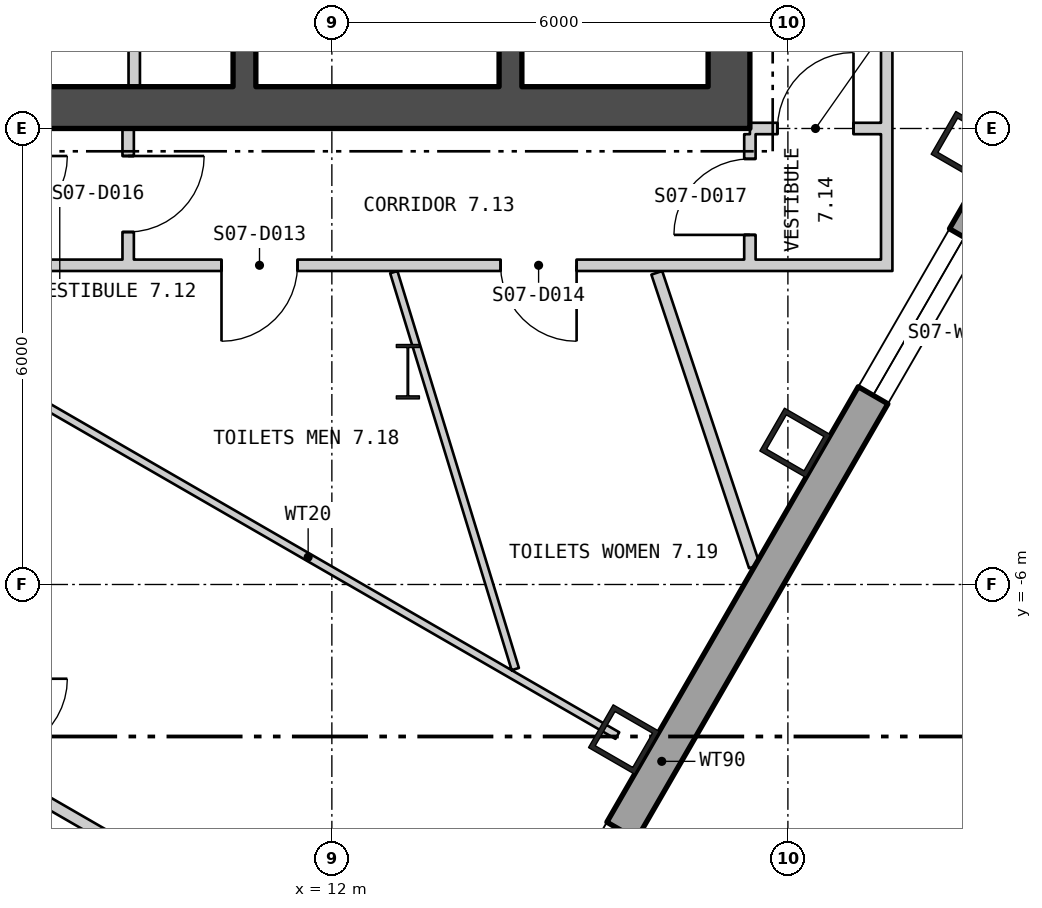
"""IFC4 building model, lengths in metres.
Left out: names, types, materials, properties, quantities, classifications, styles, units other than length and angle.
Written with IfcOpenShell. Run it as: python <this file> out.ifc"""

import sys

from ifc_helpers import new_model, si_unit, direction, frame, frame_2d, origin, origin_2d, place, context, subcontext, project, spatial, polyline, rectangle, hollow_rectangle, i_section, outline, extrude, element, fill, save


model = new_model("IFC4")
c1 = context("Model", 3, precision=1e-05, world=origin(), true_north=direction((0.0, 1.0)))
c2 = subcontext(c1, "Body", "Model", "MODEL_VIEW")
j1 = project(units=[si_unit("LENGTHUNIT", "METRE"), si_unit("PLANEANGLEUNIT", "RADIAN")], contexts=[c1])
p1 = place(None, origin())
s1 = spatial("IfcSite", under=j1, at=p1, CompositionType="ELEMENT")
p2 = place(p1, origin())
s2 = spatial("IfcBuilding", under=s1, at=p2, CompositionType="ELEMENT")
p3 = place(p2, frame((0.0, 0.0, 97.8)))
s3 = spatial("IfcBuildingStorey", under=s2, at=p3, CompositionType="ELEMENT", Elevation=97.8)
for number, where, z_axis, x_axis in (
    (1, (15.842, -8.039, 0.0), (0.0, 0.0, 1.0), (0.5, 0.866, 0.0)),
    (2, (18.096, -4.136, 0.0), (0.0, 0.0, 1.0), (0.5, 0.866, 0.0)),
    (3, (20.35, -0.232, 0.0), (0.0, 0.0, 1.0), (0.5, 0.866, 0.0)),
):
    element("IfcColumn", number, at=place(p3, frame(where, z_axis=z_axis, x_axis=x_axis)), inside=s3, PredefinedType="COLUMN", context=c2, shape_type="SweptSolid", body=[
        extrude(hollow_rectangle(XDim=0.65, YDim=0.7, WallThickness=0.065, at=origin_2d()), origin(), (0.0, 0.0, 1.0), 4.5),
    ])
p4 = place(p3, frame((13.0, -3.2, 0.0), z_axis=(0.0, 0.0, 1.0), x_axis=(1.0, 0.0, 0.0)))
e4 = element("IfcColumn", 4, at=p4, inside=s3, PredefinedType="COLUMN", context=c2, shape_type="SweptSolid", body=[
    extrude(i_section(OverallWidth=0.304, OverallDepth=0.716, WebThickness=0.021, FlangeThickness=0.04, at=origin_2d()), origin(), (0.0, 0.0, 1.0), 4.5),
])
p5 = place(p3, frame((4.905, -28.133, -0.18), z_axis=(0.0, 0.0, 1.0), x_axis=(0.500000711659, 0.866024992908, 0.0)))
e5 = element("IfcWall", 5, at=p5, inside=s3, PredefinedType="SOLIDWALL", context=c2, shape_type="SweptSolid", body=[
    extrude(outline(polyline([(-0.13, -0.225), (45.87, -0.225), (45.61, 0.225), (0.13, 0.225), (-0.13, -0.225)])), origin(), (0.0, 0.0, 1.0), 4.28),
])
p6 = place(p5, frame((1.424, 0.0, 1.08)))
e6 = element("IfcOpeningElement", 6, at=p6, cuts=e5, PredefinedType="OPENING", context=c2, shape_type="SweptSolid", body=[
    extrude(rectangle(XDim=2.4, YDim=2.6, at=frame_2d((1.2, 1.3))), frame((0.0, 0.235, 0.0), z_axis=(0.0, -1.0, 0.0), x_axis=(1.0, 0.0, 0.0)), (0.0, 0.0, 1.0), 0.47),
])
p7 = place(p5, frame((5.893, 0.0, 1.08)))
e7 = element("IfcOpeningElement", 7, at=p7, cuts=e5, PredefinedType="OPENING", context=c2, shape_type="SweptSolid", body=[
    extrude(rectangle(XDim=2.4, YDim=2.6, at=frame_2d((1.2, 1.3))), frame((0.0, 0.235, 0.0), z_axis=(0.0, -1.0, 0.0), x_axis=(1.0, 0.0, 0.0)), (0.0, 0.0, 1.0), 0.47),
])
p8 = place(p5, frame((10.401, 0.0, 1.08)))
e8 = element("IfcOpeningElement", 8, at=p8, cuts=e5, PredefinedType="OPENING", context=c2, shape_type="SweptSolid", body=[
    extrude(rectangle(XDim=2.4, YDim=2.6, at=frame_2d((1.2, 1.3))), frame((0.0, 0.235, 0.0), z_axis=(0.0, -1.0, 0.0), x_axis=(1.0, 0.0, 0.0)), (0.0, 0.0, 1.0), 0.47),
])
p9 = place(p5, frame((14.909, 0.0, 1.08)))
e9 = element("IfcOpeningElement", 9, at=p9, cuts=e5, PredefinedType="OPENING", context=c2, shape_type="SweptSolid", body=[
    extrude(rectangle(XDim=2.4, YDim=2.6, at=frame_2d((1.2, 1.3))), frame((0.0, 0.235, 0.0), z_axis=(0.0, -1.0, 0.0), x_axis=(1.0, 0.0, 0.0)), (0.0, 0.0, 1.0), 0.47),
])
p10 = place(p5, frame((19.416, 0.0, 1.08)))
e10 = element("IfcOpeningElement", 10, at=p10, cuts=e5, PredefinedType="OPENING", context=c2, shape_type="SweptSolid", body=[
    extrude(rectangle(XDim=2.4, YDim=2.6, at=frame_2d((1.2, 1.3))), frame((0.0, 0.235, 0.0), z_axis=(0.0, -1.0, 0.0), x_axis=(1.0, 0.0, 0.0)), (0.0, 0.0, 1.0), 0.47),
])
p11 = place(p5, frame((28.431, 0.0, 1.08)))
e11 = element("IfcOpeningElement", 11, at=p11, cuts=e5, PredefinedType="OPENING", context=c2, shape_type="SweptSolid", body=[
    extrude(rectangle(XDim=2.4, YDim=2.6, at=frame_2d((1.2, 1.3))), frame((0.0, 0.235, 0.0), z_axis=(0.0, -1.0, 0.0), x_axis=(1.0, 0.0, 0.0)), (0.0, 0.0, 1.0), 0.47),
])
p12 = place(p5, frame((32.939, 0.0, 1.08)))
e12 = element("IfcOpeningElement", 12, at=p12, cuts=e5, PredefinedType="OPENING", context=c2, shape_type="SweptSolid", body=[
    extrude(rectangle(XDim=2.4, YDim=2.6, at=frame_2d((1.2, 1.3))), frame((0.0, 0.235, 0.0), z_axis=(0.0, -1.0, 0.0), x_axis=(1.0, 0.0, 0.0)), (0.0, 0.0, 1.0), 0.47),
])
p13 = place(p5, frame((37.447, 0.0, 1.08)))
e13 = element("IfcOpeningElement", 13, at=p13, cuts=e5, PredefinedType="OPENING", context=c2, shape_type="SweptSolid", body=[
    extrude(rectangle(XDim=2.4, YDim=2.6, at=frame_2d((1.2, 1.3))), frame((0.0, 0.235, 0.0), z_axis=(0.0, -1.0, 0.0), x_axis=(1.0, 0.0, 0.0)), (0.0, 0.0, 1.0), 0.47),
])
p14 = place(p5, frame((41.916, 0.0, 1.08)))
e14 = element("IfcOpeningElement", 14, at=p14, cuts=e5, PredefinedType="OPENING", context=c2, shape_type="SweptSolid", body=[
    extrude(rectangle(XDim=2.4, YDim=2.6, at=frame_2d((1.2, 1.3))), frame((0.0, 0.235, 0.0), z_axis=(0.0, -1.0, 0.0), x_axis=(1.0, 0.0, 0.0)), (0.0, 0.0, 1.0), 0.47),
])
p15 = place(p3, frame((-17.5, 0.275, 0.0), z_axis=(0.0, 0.0, 1.0), x_axis=(1.0, 0.0, 0.0)))
e15 = element("IfcWall", 15, at=p15, inside=s3, PredefinedType="SHEAR", context=c2, shape_type="SweptSolid", body=[
    extrude(rectangle(XDim=35.0, YDim=0.55, at=frame_2d((17.5, 0.0))), origin(), (0.0, 0.0, 1.0), 4.3),
])
p16 = place(p15, frame((12.0, 0.0, 0.0)))
e16 = element("IfcOpeningElement", 16, at=p16, cuts=e15, PredefinedType="OPENING", context=c2, shape_type="SweptSolid", body=[
    extrude(rectangle(XDim=1.8, YDim=2.4, at=frame_2d((0.9, 1.2))), frame((0.0, 0.285, 0.0), z_axis=(0.0, -1.0, 0.0), x_axis=(1.0, 0.0, 0.0)), (0.0, 0.0, 1.0), 0.57),
])
p17 = place(p15, frame((22.0, 0.0, 0.0)))
e17 = element("IfcOpeningElement", 17, at=p17, cuts=e15, PredefinedType="OPENING", context=c2, shape_type="SweptSolid", body=[
    extrude(rectangle(XDim=1.8, YDim=2.4, at=frame_2d((0.9, 1.2))), frame((0.0, 0.285, 0.0), z_axis=(0.0, -1.0, 0.0), x_axis=(1.0, 0.0, 0.0)), (0.0, 0.0, 1.0), 0.57),
])
p18 = place(p3, frame((17.225, 0.55, 0.0), z_axis=(0.0, 0.0, 1.0), x_axis=(0.0, 1.0, 0.0)))
e18 = element("IfcWall", 18, at=p18, inside=s3, PredefinedType="SHEAR", context=c2, shape_type="SweptSolid", body=[
    extrude(rectangle(XDim=16.9, YDim=0.55, at=frame_2d((8.45, 0.0))), origin(), (0.0, 0.0, 1.0), 4.3),
])
p19 = place(p18, frame((5.75, 0.0, 0.0)))
e19 = element("IfcOpeningElement", 19, at=p19, cuts=e18, PredefinedType="OPENING", context=c2, shape_type="SweptSolid", body=[
    extrude(rectangle(XDim=1.5, YDim=2.1, at=frame_2d((0.75, 1.05))), frame((0.0, 0.285, 0.0), z_axis=(0.0, -1.0, 0.0), x_axis=(1.0, 0.0, 0.0)), (0.0, 0.0, 1.0), 0.57),
])
p20 = place(p18, frame((0.628, 0.0, 0.0)))
e20 = element("IfcOpeningElement", 20, at=p20, cuts=e18, PredefinedType="OPENING", context=c2, shape_type="SweptSolid", body=[
    extrude(rectangle(XDim=1.0, YDim=2.1, at=frame_2d((0.5, 1.05))), frame((0.0, 0.285, 0.0), z_axis=(0.0, -1.0, 0.0), x_axis=(1.0, 0.0, 0.0)), (0.0, 0.0, 1.0), 0.57),
])
p21 = place(p18, frame((3.553, 0.0, 0.0)))
e21 = element("IfcOpeningElement", 21, at=p21, cuts=e18, PredefinedType="OPENING", context=c2, shape_type="SweptSolid", body=[
    extrude(rectangle(XDim=0.9, YDim=2.1, at=frame_2d((0.45, 1.05))), frame((0.0, 0.285, 0.0), z_axis=(0.0, -1.0, 0.0), x_axis=(1.0, 0.0, 0.0)), (0.0, 0.0, 1.0), 0.57),
])
p22 = place(p18, frame((8.914, 0.0, 0.0)))
e22 = element("IfcOpeningElement", 22, at=p22, cuts=e18, PredefinedType="OPENING", context=c2, shape_type="SweptSolid", body=[
    extrude(rectangle(XDim=0.9, YDim=2.1, at=frame_2d((0.45, 1.05))), frame((0.0, 0.285, 0.0), z_axis=(0.0, -1.0, 0.0), x_axis=(1.0, 0.0, 0.0)), (0.0, 0.0, 1.0), 0.57),
])
p23 = place(p18, frame((13.739, 0.0, 0.0)))
e23 = element("IfcOpeningElement", 23, at=p23, cuts=e18, PredefinedType="OPENING", context=c2, shape_type="SweptSolid", body=[
    extrude(rectangle(XDim=0.9, YDim=2.1, at=frame_2d((0.45, 1.05))), frame((0.0, 0.285, 0.0), z_axis=(0.0, -1.0, 0.0), x_axis=(1.0, 0.0, 0.0)), (0.0, 0.0, 1.0), 0.57),
])
p24 = place(p3, frame((10.85, 0.55, 0.0), z_axis=(0.0, 0.0, 1.0), x_axis=(0.0, 1.0, 0.0)))
e24 = element("IfcWall", 24, at=p24, inside=s3, PredefinedType="SHEAR", context=c2, shape_type="SweptSolid", body=[
    extrude(rectangle(XDim=16.9, YDim=0.3, at=frame_2d((8.45, 0.0))), origin(), (0.0, 0.0, 1.0), 4.3),
])
p25 = place(p24, frame((5.125, 0.0, 0.0)))
e25 = element("IfcOpeningElement", 25, at=p25, cuts=e24, PredefinedType="OPENING", context=c2, shape_type="SweptSolid", body=[
    extrude(rectangle(XDim=1.25, YDim=2.1, at=frame_2d((0.625, 1.05))), frame((0.0, 0.16, 0.0), z_axis=(0.0, -1.0, 0.0), x_axis=(1.0, 0.0, 0.0)), (0.0, 0.0, 1.0), 0.32),
])
p26 = place(p24, frame((1.55, 0.0, 0.0)))
e26 = element("IfcOpeningElement", 26, at=p26, cuts=e24, PredefinedType="OPENING", context=c2, shape_type="SweptSolid", body=[
    extrude(rectangle(XDim=1.0, YDim=2.1, at=frame_2d((0.5, 1.05))), frame((0.0, 0.16, 0.0), z_axis=(0.0, -1.0, 0.0), x_axis=(1.0, 0.0, 0.0)), (0.0, 0.0, 1.0), 0.32),
])
p27 = place(p3, frame((14.35, 0.55, 0.0), z_axis=(0.0, 0.0, 1.0), x_axis=(0.0, 1.0, 0.0)))
e27 = element("IfcWall", 27, at=p27, inside=s3, PredefinedType="SHEAR", context=c2, shape_type="SweptSolid", body=[
    extrude(rectangle(XDim=16.9, YDim=0.3, at=frame_2d((8.45, 0.0))), origin(), (0.0, 0.0, 1.0), 4.3),
])
p28 = place(p27, frame((5.75, 0.0, 0.0)))
e28 = element("IfcOpeningElement", 28, at=p28, cuts=e27, PredefinedType="OPENING", context=c2, shape_type="SweptSolid", body=[
    extrude(rectangle(XDim=1.5, YDim=2.1, at=frame_2d((0.75, 1.05))), frame((0.0, 0.16, 0.0), z_axis=(0.0, -1.0, 0.0), x_axis=(1.0, 0.0, 0.0)), (0.0, 0.0, 1.0), 0.32),
])
p29 = place(p3, frame((9.4, 0.55, 0.0), z_axis=(0.0, 0.0, 1.0), x_axis=(0.0, 1.0, 0.0)))
e29 = element("IfcWall", 29, at=p29, inside=s3, PredefinedType="PARTITIONING", context=c2, shape_type="SweptSolid", body=[
    extrude(rectangle(XDim=3.075, YDim=0.15, at=frame_2d((1.538, 0.0))), origin(), (0.0, 0.0, 1.0), 4.3),
])
p30 = place(p3, frame((7.52, -1.8, 0.0), z_axis=(0.0, 0.0, 1.0), x_axis=(1.0, 0.0, 0.0)))
e30 = element("IfcWall", 30, at=p30, inside=s3, PredefinedType="PARTITIONING", context=c2, shape_type="SweptSolid", body=[
    extrude(rectangle(XDim=11.705, YDim=0.15, at=frame_2d((5.853, 0.0))), origin(), (0.0, 0.0, 1.0), 4.3),
])
p31 = place(p30, frame((3.028, 0.0, 0.0)))
e31 = element("IfcOpeningElement", 31, at=p31, cuts=e30, PredefinedType="OPENING", context=c2, shape_type="SweptSolid", body=[
    extrude(rectangle(XDim=1.0, YDim=2.1, at=frame_2d((0.5, 1.05))), frame((0.0, 0.085, 0.0), z_axis=(0.0, -1.0, 0.0), x_axis=(1.0, 0.0, 0.0)), (0.0, 0.0, 1.0), 0.17),
])
p32 = place(p30, frame((6.7, 0.0, 0.0)))
e32 = element("IfcOpeningElement", 32, at=p32, cuts=e30, PredefinedType="OPENING", context=c2, shape_type="SweptSolid", body=[
    extrude(rectangle(XDim=1.0, YDim=2.1, at=frame_2d((0.5, 1.05))), frame((0.0, 0.085, 0.0), z_axis=(0.0, -1.0, 0.0), x_axis=(1.0, 0.0, 0.0)), (0.0, 0.0, 1.0), 0.17),
])
p33 = place(p3, frame((7.62, -3.292, 0.0), z_axis=(0.0, 0.0, 1.0), x_axis=(0.866086324858, -0.499894466757, 0.0)))
e33 = element("IfcWall", 33, at=p33, inside=s3, PredefinedType="PARTITIONING", context=c2, shape_type="SweptSolid", body=[
    extrude(rectangle(XDim=9.394, YDim=0.1, at=frame_2d((4.697, 0.0))), origin(), (0.0, 0.0, 1.0), 4.3),
])
p34 = place(p3, frame((7.632, -8.505, 0.0), z_axis=(0.0, 0.0, 1.0), x_axis=(0.866092229152, -0.499884237201, 0.0)))
e34 = element("IfcWall", 34, at=p34, inside=s3, PredefinedType="PARTITIONING", context=c2, shape_type="SweptSolid", body=[
    extrude(rectangle(XDim=6.778, YDim=0.15, at=frame_2d((3.389, 0.0))), origin(), (0.0, 0.0, 1.0), 4.3),
])
p35 = place(p3, frame((9.32, -1.725, 0.0), z_axis=(0.0, 0.0, 1.0), x_axis=(0.0, 1.0, 0.0)))
e35 = element("IfcWall", 35, at=p35, inside=s3, PredefinedType="PARTITIONING", context=c2, shape_type="SweptSolid", body=[
    extrude(rectangle(XDim=1.725, YDim=0.15, at=frame_2d((0.863, 0.0))), origin(), (0.0, 0.0, 1.0), 4.3),
])
p36 = place(p35, frame((0.363, 0.0, 0.0)))
e36 = element("IfcOpeningElement", 36, at=p36, cuts=e35, PredefinedType="OPENING", context=c2, shape_type="SweptSolid", body=[
    extrude(rectangle(XDim=1.0, YDim=2.1, at=frame_2d((0.5, 1.05))), frame((0.0, 0.085, 0.0), z_axis=(0.0, -1.0, 0.0), x_axis=(1.0, 0.0, 0.0)), (0.0, 0.0, 1.0), 0.17),
])
p37 = place(p3, frame((12.815, -1.89, 0.0), z_axis=(0.0, 0.0, 1.0), x_axis=(0.292567369611, -0.956244913314, 0.0)))
e37 = element("IfcWall", 37, at=p37, inside=s3, PredefinedType="PARTITIONING", context=c2, shape_type="SweptSolid", body=[
    extrude(rectangle(XDim=5.462, YDim=0.1, at=frame_2d((2.731, 0.0))), origin(), (0.0, 0.0, 1.0), 4.3),
])
p38 = place(p3, frame((16.275, -1.899, 0.0), z_axis=(0.0, 0.0, 1.0), x_axis=(0.31563818617, -0.948879621149, 0.0)))
e38 = element("IfcWall", 38, at=p38, inside=s3, PredefinedType="PARTITIONING", context=c2, shape_type="SweptSolid", body=[
    extrude(rectangle(XDim=4.071, YDim=0.15, at=frame_2d((2.036, 0.0))), origin(), (0.0, 0.0, 1.0), 4.3),
])
p39 = place(p3, frame((17.5, -1.725, 0.0), z_axis=(0.0, 0.0, 1.0), x_axis=(0.0, 1.0, 0.0)))
e39 = element("IfcWall", 39, at=p39, inside=s3, PredefinedType="PARTITIONING", context=c2, shape_type="SweptSolid", body=[
    extrude(rectangle(XDim=1.65, YDim=0.15, at=frame_2d((0.825, 0.0))), origin(), (0.0, 0.0, 1.0), 4.3),
])
p40 = place(p39, frame((0.325, 0.0, 0.0)))
e40 = element("IfcOpeningElement", 40, at=p40, cuts=e39, PredefinedType="OPENING", context=c2, shape_type="SweptSolid", body=[
    extrude(rectangle(XDim=1.0, YDim=2.1, at=frame_2d((0.5, 1.05))), frame((0.0, 0.085, 0.0), z_axis=(0.0, -1.0, 0.0), x_axis=(1.0, 0.0, 0.0)), (0.0, 0.0, 1.0), 0.17),
])
p41 = place(p3, frame((17.5, 0.0, 0.0), z_axis=(0.0, 0.0, 1.0), x_axis=(1.0, 0.0, 0.0)))
e41 = element("IfcWall", 41, at=p41, inside=s3, PredefinedType="PARTITIONING", context=c2, shape_type="SweptSolid", body=[
    extrude(rectangle(XDim=1.725, YDim=0.15, at=frame_2d((0.863, 0.0))), origin(), (0.0, 0.0, 1.0), 3.7),
])
p42 = place(p41, frame((0.363, 0.0, 0.0)))
e42 = element("IfcOpeningElement", 42, at=p42, cuts=e41, PredefinedType="OPENING", context=c2, shape_type="SweptSolid", body=[
    extrude(rectangle(XDim=1.0, YDim=2.1, at=frame_2d((0.5, 1.05))), frame((0.0, 0.085, 0.0), z_axis=(0.0, -1.0, 0.0), x_axis=(1.0, 0.0, 0.0)), (0.0, 0.0, 1.0), 0.17),
])
p43 = place(p3, frame((19.3, -1.875, 0.0), z_axis=(0.0, 0.0, 1.0), x_axis=(0.0, 1.0, 0.0)))
e43 = element("IfcWall", 43, at=p43, inside=s3, PredefinedType="PARTITIONING", context=c2, shape_type="SweptSolid", body=[
    extrude(rectangle(XDim=14.173, YDim=0.15, at=frame_2d((7.087, 0.0))), origin(), (0.0, 0.0, 1.0), 4.3),
])
p44 = place(p43, frame((6.011, 0.0, 0.0)))
e44 = element("IfcOpeningElement", 44, at=p44, cuts=e43, PredefinedType="OPENING", context=c2, shape_type="SweptSolid", body=[
    extrude(rectangle(XDim=1.0, YDim=2.1, at=frame_2d((0.5, 1.05))), frame((0.0, 0.085, 0.0), z_axis=(0.0, -1.0, 0.0), x_axis=(1.0, 0.0, 0.0)), (0.0, 0.0, 1.0), 0.17),
])
p45 = place(p43, frame((12.123, 0.0, 0.0)))
e45 = element("IfcOpeningElement", 45, at=p45, cuts=e43, PredefinedType="OPENING", context=c2, shape_type="SweptSolid", body=[
    extrude(rectangle(XDim=1.0, YDim=2.1, at=frame_2d((0.5, 1.05))), frame((0.0, 0.085, 0.0), z_axis=(0.0, -1.0, 0.0), x_axis=(1.0, 0.0, 0.0)), (0.0, 0.0, 1.0), 0.17),
])
p46 = place(p10, origin())
e46 = element("IfcWindow", 46, at=p46, inside=s3, PartitioningType="SINGLE_PANEL", PredefinedType="WINDOW", context=c2, shape_type="SweptSolid", body=[
    extrude(rectangle(XDim=2.4, YDim=2.6, at=frame_2d((1.2, 1.3))), frame((0.0, 0.105, 0.0), z_axis=(0.0, -1.0, 0.0), x_axis=(1.0, 0.0, 0.0)), (0.0, 0.0, 1.0), 0.06),
])
fill(e10, e46)
p47 = place(p11, origin())
e47 = element("IfcWindow", 47, at=p47, inside=s3, PartitioningType="SINGLE_PANEL", PredefinedType="WINDOW", context=c2, shape_type="SweptSolid", body=[
    extrude(rectangle(XDim=2.4, YDim=2.6, at=frame_2d((1.2, 1.3))), frame((0.0, 0.105, 0.0), z_axis=(0.0, -1.0, 0.0), x_axis=(1.0, 0.0, 0.0)), (0.0, 0.0, 1.0), 0.06),
])
fill(e11, e47)
p48 = place(p31, origin())
e48 = element("IfcDoor", 48, at=p48, inside=s3, OperationType="SINGLE_SWING_LEFT", PredefinedType="DOOR", context=c2, shape_type="SweptSolid", body=[
    extrude(rectangle(XDim=1.0, YDim=2.1, at=frame_2d((0.5, 1.05))), frame((0.0, 0.025, 0.0), z_axis=(0.0, -1.0, 0.0), x_axis=(1.0, 0.0, 0.0)), (0.0, 0.0, 1.0), 0.05),
])
fill(e31, e48)
p49 = place(p32, origin())
e49 = element("IfcDoor", 49, at=p49, inside=s3, OperationType="SINGLE_SWING_RIGHT", PredefinedType="DOOR", context=c2, shape_type="SweptSolid", body=[
    extrude(rectangle(XDim=1.0, YDim=2.1, at=frame_2d((0.5, 1.05))), frame((0.0, 0.025, 0.0), z_axis=(0.0, -1.0, 0.0), x_axis=(1.0, 0.0, 0.0)), (0.0, 0.0, 1.0), 0.05),
])
fill(e32, e49)
p50 = place(p36, origin())
e50 = element("IfcDoor", 50, at=p50, inside=s3, OperationType="SINGLE_SWING_RIGHT", PredefinedType="DOOR", context=c2, shape_type="SweptSolid", body=[
    extrude(rectangle(XDim=1.0, YDim=2.1, at=frame_2d((0.5, 1.05))), frame((0.0, 0.025, 0.0), z_axis=(0.0, -1.0, 0.0), x_axis=(1.0, 0.0, 0.0)), (0.0, 0.0, 1.0), 0.05),
])
fill(e36, e50)
p51 = place(p40, origin())
e51 = element("IfcDoor", 51, at=p51, inside=s3, OperationType="SINGLE_SWING_RIGHT", PredefinedType="DOOR", context=c2, shape_type="SweptSolid", body=[
    extrude(rectangle(XDim=1.0, YDim=2.1, at=frame_2d((0.5, 1.05))), frame((0.0, 0.025, 0.0), z_axis=(0.0, -1.0, 0.0), x_axis=(1.0, 0.0, 0.0)), (0.0, 0.0, 1.0), 0.05),
])
fill(e40, e51)
p52 = place(p42, origin())
e52 = element("IfcDoor", 52, at=p52, inside=s3, OperationType="SINGLE_SWING_LEFT", PredefinedType="DOOR", context=c2, shape_type="SweptSolid", body=[
    extrude(rectangle(XDim=1.0, YDim=2.1, at=frame_2d((0.5, 1.05))), frame((0.0, 0.025, 0.0), z_axis=(0.0, -1.0, 0.0), x_axis=(1.0, 0.0, 0.0)), (0.0, 0.0, 1.0), 0.05),
])
fill(e42, e52)
save(model, sys.argv[1])
